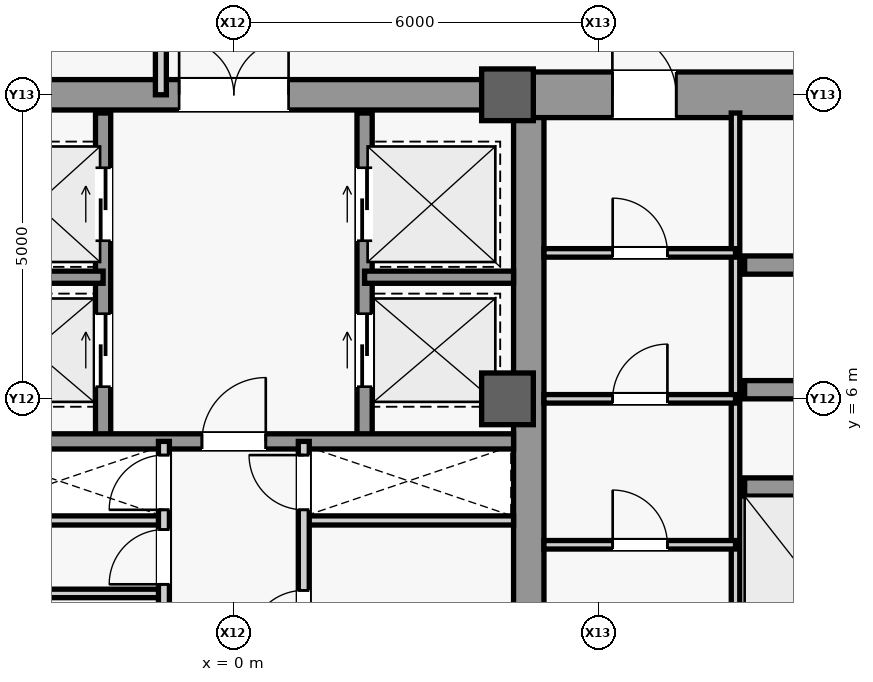
"""IFC4 building model, lengths in metres.
Left out: names, types, materials, properties, quantities, classifications, styles, units other than length and angle.
Written with IfcOpenShell. Run it as: python <this file> out.ifc"""

import sys

from ifc_helpers import new_model, si_unit, direction, frame, frame_2d, origin, origin_2d, place, context, subcontext, project, spatial, rectangle, extrude, source, transform, mapped, element, fill, save


model = new_model("IFC4")
c1 = context("Model", 3, precision=1e-05, world=origin(), true_north=direction((0.0, 1.0)))
c2 = subcontext(c1, "Body", "Model", "MODEL_VIEW")
j1 = project(units=[si_unit("LENGTHUNIT", "METRE"), si_unit("PLANEANGLEUNIT", "RADIAN")], contexts=[c1])
p1 = place(None, origin())
s1 = spatial("IfcSite", under=j1, at=p1, CompositionType="ELEMENT")
p2 = place(p1, origin())
s2 = spatial("IfcBuilding", under=s1, at=p2, CompositionType="ELEMENT")
p3 = place(p2, frame((0.0, 0.0, 195.1)))
s3 = spatial("IfcBuildingStorey", under=s2, at=p3, CompositionType="ELEMENT", Elevation=195.1)
m1 = source(origin(), c2, "Body", "SweptSolid", [
    extrude(rectangle(XDim=21.4, YDim=0.5, at=frame_2d((10.7, 0.0))), origin(), (0.0, 0.0, 1.0), 3.78),
])
p4 = place(p3, frame((4.85, -10.7, 0.0), z_axis=(0.0, 0.0, 1.0), x_axis=(0.0, 1.0, 0.0)))
e1 = element("IfcWall", 1, at=p4, inside=s3, PredefinedType="SHEAR", context=c2, shape_type="MappedRepresentation", body=[
    mapped(m1, transform((0.0, 0.0, 0.0), scale=1.0)),
])
m2 = source(origin(), c2, "Body", "SweptSolid", [
    extrude(rectangle(XDim=5.85, YDim=0.75, at=frame_2d((2.925, 0.0))), origin(), (0.0, 0.0, 1.0), 3.78),
])
p5 = place(p3, frame((4.85, 11.0, 0.0), z_axis=(0.0, 0.0, 1.0), x_axis=(1.0, 0.0, 0.0)))
e2 = element("IfcWall", 2, at=p5, inside=s3, PredefinedType="SHEAR", context=c2, shape_type="MappedRepresentation", body=[
    mapped(m2, transform((0.0, 0.0, 0.0), scale=1.0)),
])
m3 = source(origin(), c2, "Body", "SweptSolid", [
    extrude(rectangle(XDim=1.05, YDim=2.2, at=frame_2d((0.525, 1.1))), frame((0.0, 0.385, 0.0), z_axis=(0.0, -1.0, 0.0), x_axis=(1.0, 0.0, 0.0)), (0.0, 0.0, 1.0), 0.77),
])
p6 = place(p5, frame((1.375, 0.0, 0.0)))
e3 = element("IfcOpeningElement", 3, at=p6, cuts=e2, PredefinedType="OPENING", context=c2, shape_type="MappedRepresentation", body=[
    mapped(m3, transform((0.0, 0.0, 0.0), scale=1.0)),
])
m4 = source(origin(), c2, "Body", "SweptSolid", [
    extrude(rectangle(XDim=9.2, YDim=0.5, at=frame_2d((4.6, 0.0))), origin(), (0.0, 0.0, 1.0), 3.78),
])
p7 = place(p3, frame((-4.6, 11.0, 0.0), z_axis=(0.0, 0.0, 1.0), x_axis=(1.0, 0.0, 0.0)))
e4 = element("IfcWall", 4, at=p7, inside=s3, PredefinedType="SHEAR", context=c2, shape_type="MappedRepresentation", body=[
    mapped(m4, transform((0.0, 0.0, 0.0), scale=1.0)),
])
m5 = source(origin(), c2, "Body", "SweptSolid", [
    extrude(rectangle(XDim=1.8, YDim=2.25, at=frame_2d((0.9, 1.125))), frame((0.0, 0.26, 0.0), z_axis=(0.0, -1.0, 0.0), x_axis=(1.0, 0.0, 0.0)), (0.0, 0.0, 1.0), 0.52),
])
p8 = place(p7, frame((3.7, 0.0, 0.0)))
e5 = element("IfcOpeningElement", 5, at=p8, cuts=e4, PredefinedType="OPENING", context=c2, shape_type="MappedRepresentation", body=[
    mapped(m5, transform((0.0, 0.0, 0.0), scale=1.0)),
])
m6 = source(origin(), c2, "Body", "SweptSolid", [
    extrude(rectangle(XDim=0.85, YDim=0.85, at=origin_2d()), origin(), (0.0, 0.0, 1.0), 4.0),
])
for number, where, z_axis, x_axis in (
    (6, (4.5, 6.0, 0.0), (0.0, 0.0, 1.0), (1.0, 0.0, 0.0)),
    (7, (4.5, 11.0, 0.0), (0.0, 0.0, 1.0), (1.0, 0.0, 0.0)),
):
    element("IfcColumn", number, at=place(p3, frame(where, z_axis=z_axis, x_axis=x_axis)), inside=s3, PredefinedType="COLUMN", context=c2, shape_type="MappedRepresentation", body=[
        mapped(m6, transform((0.0, 0.0, 0.0), scale=1.0)),
    ])
m7 = source(origin(), c2, "Body", "SweptSolid", [
    extrude(rectangle(XDim=2.3, YDim=0.3, at=frame_2d((1.15, 0.0))), origin(), (0.0, 0.0, 1.0), 3.78),
])
for number, where, z_axis, x_axis in (
    (8, (8.4, 4.55, 0.0), (0.0, 0.0, 1.0), (1.0, 0.0, 0.0)),
    (9, (8.4, 6.15, 0.0), (0.0, 0.0, 1.0), (1.0, 0.0, 0.0)),
    (10, (8.4, 8.2, 0.0), (0.0, 0.0, 1.0), (1.0, 0.0, 0.0)),
):
    element("IfcWall", number, at=place(p3, frame(where, z_axis=z_axis, x_axis=x_axis)), inside=s3, PredefinedType="SHEAR", context=c2, shape_type="MappedRepresentation", body=[
        mapped(m7, transform((0.0, 0.0, 0.0), scale=1.0)),
    ])
m8 = source(origin(), c2, "Body", "SweptSolid", [
    extrude(rectangle(XDim=9.4, YDim=0.14, at=frame_2d((4.7, 0.0))), origin(), (0.0, 0.0, 1.0), 3.78),
])
p9 = place(p3, frame((8.25, 1.3, 0.0), z_axis=(0.0, 0.0, 1.0), x_axis=(0.0, 1.0, 0.0)))
e11 = element("IfcWall", 11, at=p9, inside=s3, PredefinedType="PARTITIONING", context=c2, shape_type="MappedRepresentation", body=[
    mapped(m8, transform((0.0, 0.0, 0.0), scale=1.0)),
])
m9 = source(origin(), c2, "Body", "SweptSolid", [
    extrude(rectangle(XDim=3.15, YDim=0.14, at=frame_2d((1.575, 0.0))), origin(), (0.0, 0.0, 1.0), 3.78),
])
p10 = place(p3, frame((5.1, 8.4, 0.0), z_axis=(0.0, 0.0, 1.0), x_axis=(1.0, 0.0, 0.0)))
e12 = element("IfcWall", 12, at=p10, inside=s3, PredefinedType="PARTITIONING", context=c2, shape_type="MappedRepresentation", body=[
    mapped(m9, transform((0.0, 0.0, 0.0), scale=1.0)),
])
m10 = source(origin(), c2, "Body", "SweptSolid", [
    extrude(rectangle(XDim=0.9, YDim=2.15, at=frame_2d((0.45, 1.075))), frame((0.0, 0.08, 0.0), z_axis=(0.0, -1.0, 0.0), x_axis=(1.0, 0.0, 0.0)), (0.0, 0.0, 1.0), 0.16),
])
p11 = place(p10, frame((1.13, 0.0, 0.0)))
e13 = element("IfcOpeningElement", 13, at=p11, cuts=e12, PredefinedType="OPENING", context=c2, shape_type="MappedRepresentation", body=[
    mapped(m10, transform((0.0, 0.0, 0.0), scale=1.0)),
])
p12 = place(p3, frame((5.1, 6.0, 0.0), z_axis=(0.0, 0.0, 1.0), x_axis=(1.0, 0.0, 0.0)))
e14 = element("IfcWall", 14, at=p12, inside=s3, PredefinedType="PARTITIONING", context=c2, shape_type="MappedRepresentation", body=[
    mapped(m9, transform((0.0, 0.0, 0.0), scale=1.0)),
])
p13 = place(p12, frame((1.13, 0.0, 0.0)))
e15 = element("IfcOpeningElement", 15, at=p13, cuts=e14, PredefinedType="OPENING", context=c2, shape_type="MappedRepresentation", body=[
    mapped(m10, transform((0.0, 0.0, 0.0), scale=1.0)),
])
p14 = place(p3, frame((5.1, 3.6, 0.0), z_axis=(0.0, 0.0, 1.0), x_axis=(1.0, 0.0, 0.0)))
e16 = element("IfcWall", 16, at=p14, inside=s3, PredefinedType="PARTITIONING", context=c2, shape_type="MappedRepresentation", body=[
    mapped(m9, transform((0.0, 0.0, 0.0), scale=1.0)),
])
p15 = place(p14, frame((1.13, 0.0, 0.0)))
e17 = element("IfcOpeningElement", 17, at=p15, cuts=e16, PredefinedType="OPENING", context=c2, shape_type="MappedRepresentation", body=[
    mapped(m10, transform((0.0, 0.0, 0.0), scale=1.0)),
])
m11 = source(origin(), c2, "Body", "SweptSolid", [
    extrude(rectangle(XDim=3.45, YDim=0.15, at=frame_2d((1.725, 0.0))), origin(), (0.0, 0.0, 1.0), 3.78),
])
for number, where, z_axis, x_axis in (
    (18, (-4.6, 4.0, 0.0), (0.0, 0.0, 1.0), (1.0, 0.0, 0.0)),
    (19, (1.15, 4.0, 0.0), (0.0, 0.0, 1.0), (1.0, 0.0, 0.0)),
):
    element("IfcWall", number, at=place(p3, frame(where, z_axis=z_axis, x_axis=x_axis)), inside=s3, PredefinedType="PARTITIONING", context=c2, shape_type="MappedRepresentation", body=[
        mapped(m11, transform((0.0, 0.0, 0.0), scale=1.0)),
    ])
m12 = source(origin(), c2, "Body", "SweptSolid", [
    extrude(rectangle(XDim=5.4, YDim=0.25, at=frame_2d((2.7, 0.0))), origin(), (0.0, 0.0, 1.0), 3.78),
])
p16 = place(p3, frame((-2.15, 5.3, 0.0), z_axis=(0.0, 0.0, 1.0), x_axis=(0.0, 1.0, 0.0)))
e20 = element("IfcWall", 20, at=p16, inside=s3, PredefinedType="SHEAR", context=c2, shape_type="MappedRepresentation", body=[
    mapped(m12, transform((0.0, 0.0, 0.0), scale=1.0)),
])
m13 = source(origin(), c2, "Body", "SweptSolid", [
    extrude(rectangle(XDim=1.2, YDim=2.3, at=frame_2d((0.6, 1.15))), frame((0.0, 0.135, 0.0), z_axis=(0.0, -1.0, 0.0), x_axis=(1.0, 0.0, 0.0)), (0.0, 0.0, 1.0), 0.27),
])
p17 = place(p16, frame((3.3, 0.0, 0.0)))
e21 = element("IfcOpeningElement", 21, at=p17, cuts=e20, PredefinedType="OPENING", context=c2, shape_type="MappedRepresentation", body=[
    mapped(m13, transform((0.0, 0.0, 0.0), scale=1.0)),
])
p18 = place(p16, frame((0.9, 0.0, 0.0)))
e22 = element("IfcOpeningElement", 22, at=p18, cuts=e20, PredefinedType="OPENING", context=c2, shape_type="MappedRepresentation", body=[
    mapped(m13, transform((0.0, 0.0, 0.0), scale=1.0)),
])
p19 = place(p3, frame((2.15, 5.3, 0.0), z_axis=(0.0, 0.0, 1.0), x_axis=(0.0, 1.0, 0.0)))
e23 = element("IfcWall", 23, at=p19, inside=s3, PredefinedType="SHEAR", context=c2, shape_type="MappedRepresentation", body=[
    mapped(m12, transform((0.0, 0.0, 0.0), scale=1.0)),
])
p20 = place(p19, frame((3.3, 0.0, 0.0)))
e24 = element("IfcOpeningElement", 24, at=p20, cuts=e23, PredefinedType="OPENING", context=c2, shape_type="MappedRepresentation", body=[
    mapped(m13, transform((0.0, 0.0, 0.0), scale=1.0)),
])
p21 = place(p19, frame((0.9, 0.0, 0.0)))
e25 = element("IfcOpeningElement", 25, at=p21, cuts=e23, PredefinedType="OPENING", context=c2, shape_type="MappedRepresentation", body=[
    mapped(m13, transform((0.0, 0.0, 0.0), scale=1.0)),
])
m14 = source(origin(), c2, "Body", "SweptSolid", [
    extrude(rectangle(XDim=2.45, YDim=0.2, at=frame_2d((1.225, 0.0))), origin(), (0.0, 0.0, 1.0), 3.78),
])
for number, where, z_axis, x_axis in (
    (26, (-4.6, 8.0, 0.0), (0.0, 0.0, 1.0), (1.0, 0.0, 0.0)),
    (27, (2.15, 8.0, 0.0), (0.0, 0.0, 1.0), (1.0, 0.0, 0.0)),
):
    element("IfcWall", number, at=place(p3, frame(where, z_axis=z_axis, x_axis=x_axis)), inside=s3, PredefinedType="SHEAR", context=c2, shape_type="MappedRepresentation", body=[
        mapped(m14, transform((0.0, 0.0, 0.0), scale=1.0)),
    ])
m15 = source(origin(), c2, "Body", "SweptSolid", [
    extrude(rectangle(XDim=9.2, YDim=0.25, at=frame_2d((4.6, 0.0))), origin(), (0.0, 0.0, 1.0), 3.78),
])
p22 = place(p3, frame((-4.6, 5.3, 0.0), z_axis=(0.0, 0.0, 1.0), x_axis=(1.0, 0.0, 0.0)))
e28 = element("IfcWall", 28, at=p22, inside=s3, PredefinedType="SHEAR", context=c2, shape_type="MappedRepresentation", body=[
    mapped(m15, transform((0.0, 0.0, 0.0), scale=1.0)),
])
m16 = source(origin(), c2, "Body", "SweptSolid", [
    extrude(rectangle(XDim=1.05, YDim=2.2, at=frame_2d((0.525, 1.1))), frame((0.0, 0.135, 0.0), z_axis=(0.0, -1.0, 0.0), x_axis=(1.0, 0.0, 0.0)), (0.0, 0.0, 1.0), 0.27),
])
p23 = place(p22, frame((4.075, 0.0, 0.0)))
e29 = element("IfcOpeningElement", 29, at=p23, cuts=e28, PredefinedType="OPENING", context=c2, shape_type="MappedRepresentation", body=[
    mapped(m16, transform((0.0, 0.0, 0.0), scale=1.0)),
])
m17 = source(origin(), c2, "Body", "SweptSolid", [
    extrude(rectangle(XDim=3.45, YDim=0.14, at=frame_2d((1.725, 0.0))), origin(), (0.0, 0.0, 1.0), 3.78),
])
p24 = place(p3, frame((-4.6, 2.8, 0.0), z_axis=(0.0, 0.0, 1.0), x_axis=(1.0, 0.0, 0.0)))
e30 = element("IfcWall", 30, at=p24, inside=s3, PredefinedType="PARTITIONING", context=c2, shape_type="MappedRepresentation", body=[
    mapped(m17, transform((0.0, 0.0, 0.0), scale=1.0)),
])
m18 = source(origin(), c2, "Body", "SweptSolid", [
    extrude(rectangle(XDim=10.6, YDim=0.18, at=frame_2d((5.3, 0.0))), origin(), (0.0, 0.0, 1.0), 3.78),
])
p25 = place(p3, frame((-1.15, -5.3, 0.0), z_axis=(0.0, 0.0, 1.0), x_axis=(0.0, 1.0, 0.0)))
e31 = element("IfcWall", 31, at=p25, inside=s3, PredefinedType="PARTITIONING", context=c2, shape_type="MappedRepresentation", body=[
    mapped(m18, transform((0.0, 0.0, 0.0), scale=1.0)),
])
m19 = source(origin(), c2, "Body", "SweptSolid", [
    extrude(rectangle(XDim=0.9, YDim=2.15, at=frame_2d((0.45, 1.075))), frame((0.0, 0.1, 0.0), z_axis=(0.0, -1.0, 0.0), x_axis=(1.0, 0.0, 0.0)), (0.0, 0.0, 1.0), 0.2),
])
p26 = place(p25, frame((0.9, 0.0, 0.0)))
e32 = element("IfcOpeningElement", 32, at=p26, cuts=e31, PredefinedType="OPENING", context=c2, shape_type="MappedRepresentation", body=[
    mapped(m19, transform((0.0, 0.0, 0.0), scale=1.0)),
])
p27 = place(p25, frame((3.65, 0.0, 0.0)))
e33 = element("IfcOpeningElement", 33, at=p27, cuts=e31, PredefinedType="OPENING", context=c2, shape_type="MappedRepresentation", body=[
    mapped(m19, transform((0.0, 0.0, 0.0), scale=1.0)),
])
p28 = place(p25, frame((6.35, 0.0, 0.0)))
e34 = element("IfcOpeningElement", 34, at=p28, cuts=e31, PredefinedType="OPENING", context=c2, shape_type="MappedRepresentation", body=[
    mapped(m19, transform((0.0, 0.0, 0.0), scale=1.0)),
])
p29 = place(p25, frame((8.25, 0.0, 0.0)))
e35 = element("IfcOpeningElement", 35, at=p29, cuts=e31, PredefinedType="OPENING", context=c2, shape_type="MappedRepresentation", body=[
    mapped(m19, transform((0.0, 0.0, 0.0), scale=1.0)),
])
p30 = place(p25, frame((9.475, 0.0, 0.0)))
e36 = element("IfcOpeningElement", 36, at=p30, cuts=e31, PredefinedType="OPENING", context=c2, shape_type="MappedRepresentation", body=[
    mapped(m19, transform((0.0, 0.0, 0.0), scale=1.0)),
])
p31 = place(p3, frame((1.15, -5.3, 0.0), z_axis=(0.0, 0.0, 1.0), x_axis=(0.0, 1.0, 0.0)))
e37 = element("IfcWall", 37, at=p31, inside=s3, PredefinedType="PARTITIONING", context=c2, shape_type="MappedRepresentation", body=[
    mapped(m18, transform((0.0, 0.0, 0.0), scale=1.0)),
])
p32 = place(p31, frame((2.6, 0.0, 0.0)))
e38 = element("IfcOpeningElement", 38, at=p32, cuts=e37, PredefinedType="OPENING", context=c2, shape_type="MappedRepresentation", body=[
    mapped(m19, transform((0.0, 0.0, 0.0), scale=1.0)),
])
p33 = place(p31, frame((7.25, 0.0, 0.0)))
e39 = element("IfcOpeningElement", 39, at=p33, cuts=e37, PredefinedType="OPENING", context=c2, shape_type="MappedRepresentation", body=[
    mapped(m19, transform((0.0, 0.0, 0.0), scale=1.0)),
])
p34 = place(p31, frame((9.475, 0.0, 0.0)))
e40 = element("IfcOpeningElement", 40, at=p34, cuts=e37, PredefinedType="OPENING", context=c2, shape_type="MappedRepresentation", body=[
    mapped(m19, transform((0.0, 0.0, 0.0), scale=1.0)),
])
m20 = source(origin(), c2, "Body", "SweptSolid", [
    extrude(rectangle(XDim=2.5, YDim=0.18, at=frame_2d((1.25, 0.0))), origin(), (0.0, 0.0, 1.0), 3.78),
])
p35 = place(p3, frame((-1.2, 11.0, 0.0), z_axis=(0.0, 0.0, 1.0), x_axis=(0.0, 1.0, 0.0)))
e41 = element("IfcWall", 41, at=p35, inside=s3, PredefinedType="PARTITIONING", context=c2, shape_type="MappedRepresentation", body=[
    mapped(m20, transform((0.0, 0.0, 0.0), scale=1.0)),
])
m21 = source(origin(), c2, "Body", "SweptSolid", [
    extrude(rectangle(XDim=1.05, YDim=2.2, at=frame_2d((0.525, 1.1))), frame((0.0, 0.025, 0.0), z_axis=(0.0, -1.0, 0.0), x_axis=(1.0, 0.0, 0.0)), (0.0, 0.0, 1.0), 0.05),
])
p36 = place(p6, origin())
e42 = element("IfcDoor", 42, at=p36, inside=s3, OperationType="SINGLE_SWING_LEFT", PredefinedType="DOOR", context=c2, shape_type="MappedRepresentation", body=[
    mapped(m21, transform((0.0, 0.0, 0.0), scale=1.0)),
])
fill(e3, e42)
m22 = source(origin(), c2, "Body", "SweptSolid", [
    extrude(rectangle(XDim=0.9, YDim=2.15, at=frame_2d((0.45, 1.075))), frame((0.0, 0.025, 0.0), z_axis=(0.0, -1.0, 0.0), x_axis=(1.0, 0.0, 0.0)), (0.0, 0.0, 1.0), 0.05),
])
p37 = place(p11, origin())
e43 = element("IfcDoor", 43, at=p37, inside=s3, OperationType="SINGLE_SWING_LEFT", PredefinedType="DOOR", context=c2, shape_type="MappedRepresentation", body=[
    mapped(m22, transform((0.0, 0.0, 0.0), scale=1.0)),
])
fill(e13, e43)
p38 = place(p13, origin())
e44 = element("IfcDoor", 44, at=p38, inside=s3, OperationType="SINGLE_SWING_RIGHT", PredefinedType="DOOR", context=c2, shape_type="MappedRepresentation", body=[
    mapped(m22, transform((0.0, 0.0, 0.0), scale=1.0)),
])
fill(e15, e44)
p39 = place(p15, origin())
e45 = element("IfcDoor", 45, at=p39, inside=s3, OperationType="SINGLE_SWING_LEFT", PredefinedType="DOOR", context=c2, shape_type="MappedRepresentation", body=[
    mapped(m22, transform((0.0, 0.0, 0.0), scale=1.0)),
])
fill(e17, e45)
p40 = place(p23, origin())
e46 = element("IfcDoor", 46, at=p40, inside=s3, OperationType="SINGLE_SWING_RIGHT", PredefinedType="DOOR", context=c2, shape_type="MappedRepresentation", body=[
    mapped(m21, transform((0.0, 0.0, 0.0), scale=1.0)),
])
fill(e29, e46)
m23 = source(origin(), c2, "Body", "SweptSolid", [
    extrude(rectangle(XDim=1.8, YDim=2.25, at=frame_2d((0.9, 1.125))), frame((0.0, 0.025, 0.0), z_axis=(0.0, -1.0, 0.0), x_axis=(1.0, 0.0, 0.0)), (0.0, 0.0, 1.0), 0.05),
])
p41 = place(p8, origin())
e47 = element("IfcDoor", 47, at=p41, inside=s3, OperationType="SINGLE_SWING_RIGHT", PredefinedType="DOOR", context=c2, shape_type="MappedRepresentation", body=[
    mapped(m23, transform((0.0, 0.0, 0.0), scale=1.0)),
])
fill(e5, e47)
p42 = place(p29, origin())
e48 = element("IfcDoor", 48, at=p42, inside=s3, OperationType="SINGLE_SWING_LEFT", PredefinedType="DOOR", context=c2, shape_type="MappedRepresentation", body=[
    mapped(m22, transform((0.0, 0.0, 0.0), scale=1.0)),
])
fill(e35, e48)
p43 = place(p33, origin())
e49 = element("IfcDoor", 49, at=p43, inside=s3, OperationType="SINGLE_SWING_LEFT", PredefinedType="DOOR", context=c2, shape_type="MappedRepresentation", body=[
    mapped(m22, transform((0.0, 0.0, 0.0), scale=1.0)),
])
fill(e39, e49)
p44 = place(p30, origin())
e50 = element("IfcDoor", 50, at=p44, inside=s3, OperationType="SINGLE_SWING_LEFT", PredefinedType="DOOR", context=c2, shape_type="MappedRepresentation", body=[
    mapped(m22, transform((0.0, 0.0, 0.0), scale=1.0)),
])
fill(e36, e50)
p45 = place(p34, origin())
e51 = element("IfcDoor", 51, at=p45, inside=s3, OperationType="SINGLE_SWING_RIGHT", PredefinedType="DOOR", context=c2, shape_type="MappedRepresentation", body=[
    mapped(m22, transform((0.0, 0.0, 0.0), scale=1.0)),
])
fill(e40, e51)
m24 = source(origin(), c2, "Body", "SweptSolid", [
    extrude(rectangle(XDim=1.2, YDim=2.3, at=frame_2d((0.6, 1.15))), frame((0.0, 0.025, 0.0), z_axis=(0.0, -1.0, 0.0), x_axis=(1.0, 0.0, 0.0)), (0.0, 0.0, 1.0), 0.05),
])
p46 = place(p17, origin())
e52 = element("IfcDoor", 52, at=p46, inside=s3, OperationType="SLIDING_TO_LEFT", PredefinedType="DOOR", context=c2, shape_type="MappedRepresentation", body=[
    mapped(m24, transform((0.0, 0.0, 0.0), scale=1.0)),
])
fill(e21, e52)
p47 = place(p20, origin())
e53 = element("IfcDoor", 53, at=p47, inside=s3, OperationType="SLIDING_TO_LEFT", PredefinedType="DOOR", context=c2, shape_type="MappedRepresentation", body=[
    mapped(m24, transform((0.0, 0.0, 0.0), scale=1.0)),
])
fill(e24, e53)
p48 = place(p18, origin())
e54 = element("IfcDoor", 54, at=p48, inside=s3, OperationType="SLIDING_TO_LEFT", PredefinedType="DOOR", context=c2, shape_type="MappedRepresentation", body=[
    mapped(m24, transform((0.0, 0.0, 0.0), scale=1.0)),
])
fill(e22, e54)
p49 = place(p21, origin())
e55 = element("IfcDoor", 55, at=p49, inside=s3, OperationType="SLIDING_TO_LEFT", PredefinedType="DOOR", context=c2, shape_type="MappedRepresentation", body=[
    mapped(m24, transform((0.0, 0.0, 0.0), scale=1.0)),
])
fill(e25, e55)
save(model, sys.argv[1])
